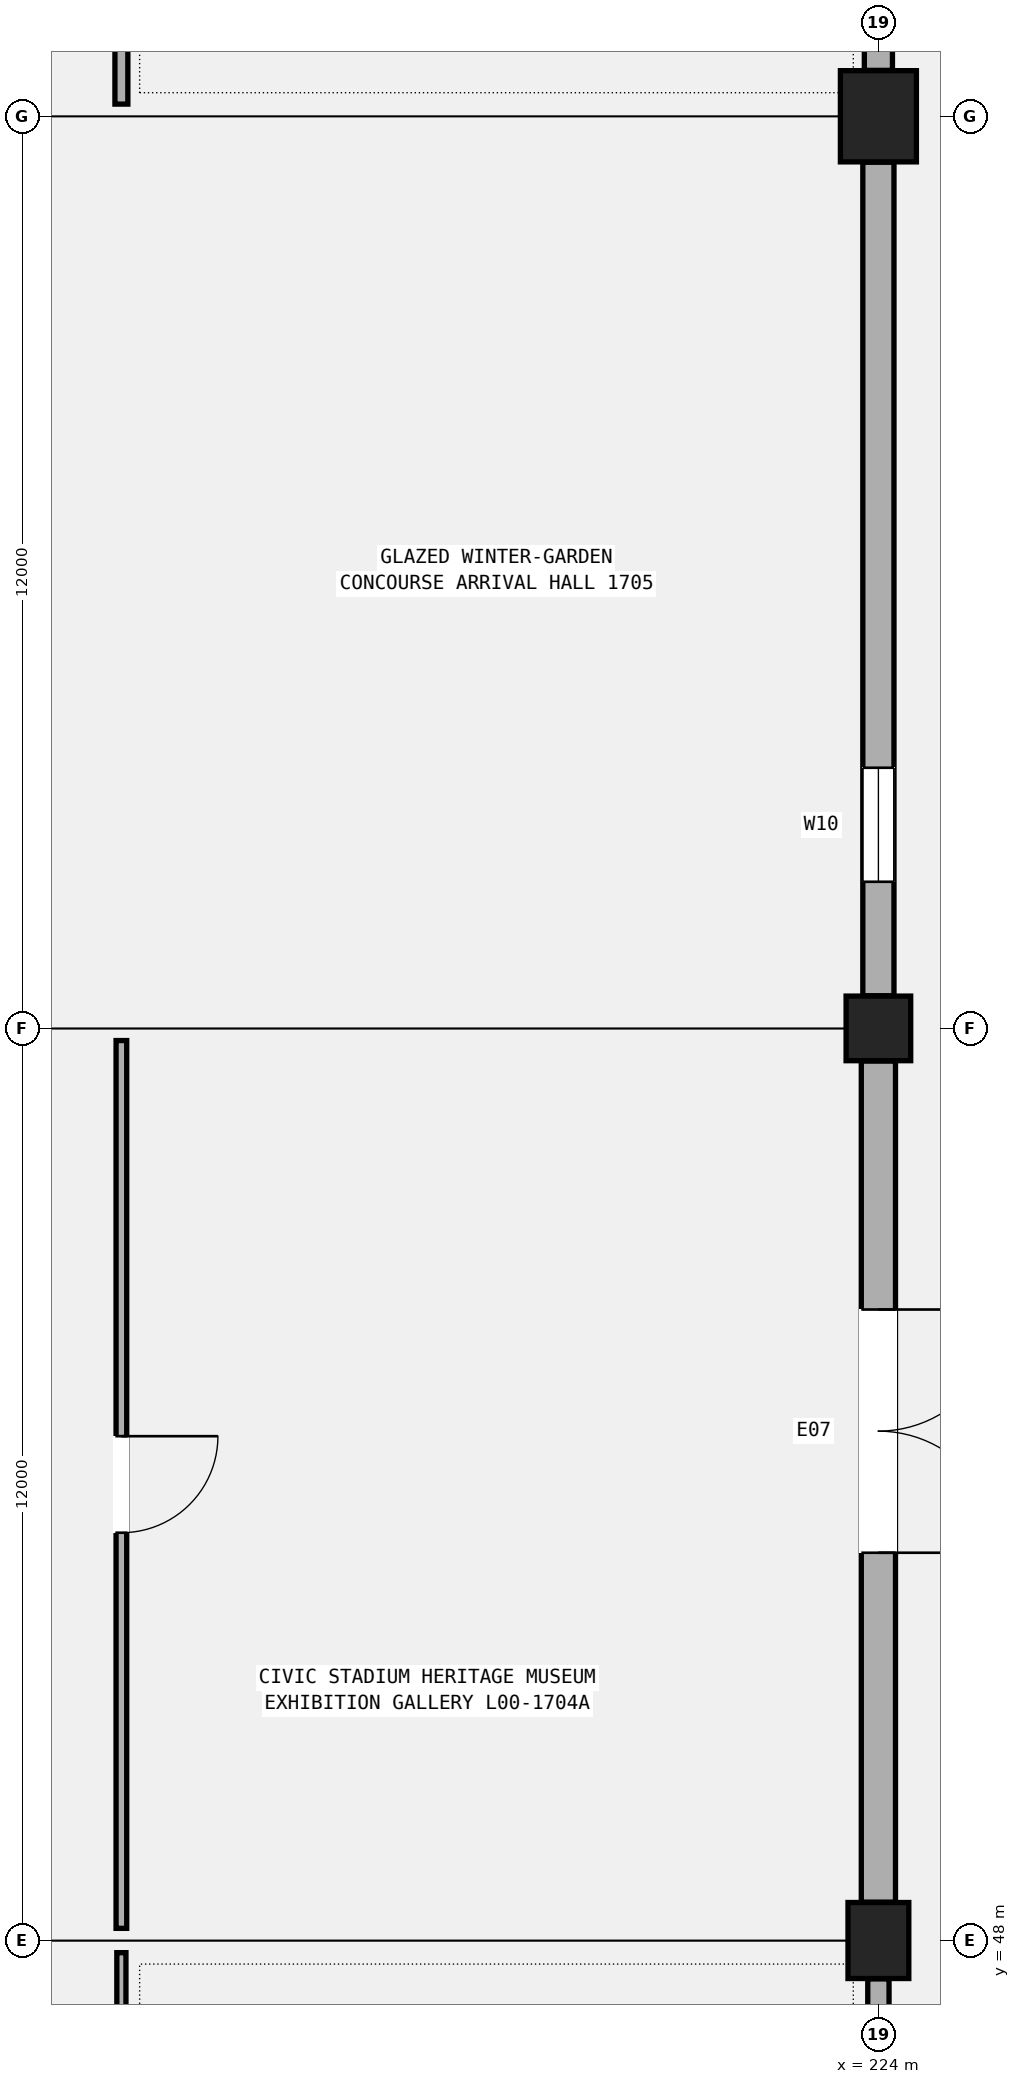
"""IFC4 building model, lengths in metres.
Left out: names, types, materials, properties, quantities, classifications, styles, units other than length and angle.
Written with IfcOpenShell. Run it as: python <this file> out.ifc"""

import sys

from ifc_helpers import new_model, si_unit, direction, frame, frame_2d, origin, origin_2d, place, context, subcontext, project, spatial, rectangle, circle, extrude, element, fill, save


model = new_model("IFC4")
c1 = context("Model", 3, precision=1e-05, world=origin(), true_north=direction((0.0, 1.0)))
c2 = subcontext(c1, "Body", "Model", "MODEL_VIEW")
j1 = project(units=[si_unit("LENGTHUNIT", "METRE"), si_unit("PLANEANGLEUNIT", "RADIAN")], contexts=[c1])
p1 = place(None, origin())
s1 = spatial("IfcSite", under=j1, at=p1, CompositionType="ELEMENT")
p2 = place(p1, origin())
s2 = spatial("IfcBuilding", under=s1, at=p2, CompositionType="ELEMENT")
p3 = place(p2, origin())
s3 = spatial("IfcBuildingStorey", under=s2, at=p3, CompositionType="ELEMENT", Elevation=0.0)
p4 = place(p3, frame((224.0, 48.0, 0.0), z_axis=(0.0, 0.0, 1.0), x_axis=(1.0, 0.0, 0.0)))
e1 = element("IfcColumn", 1, at=p4, inside=s3, PredefinedType="COLUMN", context=c2, shape_type="SweptSolid", body=[
    extrude(rectangle(XDim=0.8, YDim=1.0, at=origin_2d()), origin(), (0.0, 0.0, 1.0), 5.4),
])
p5 = place(p3, frame((224.0, 60.0, 0.0), z_axis=(0.0, 0.0, 1.0), x_axis=(1.0, 0.0, 0.0)))
e2 = element("IfcColumn", 2, at=p5, inside=s3, PredefinedType="COLUMN", context=c2, shape_type="SweptSolid", body=[
    extrude(circle(Radius=0.425, at=origin_2d()), origin(), (0.0, 0.0, 1.0), 5.4),
])
p6 = place(p3, frame((224.0, 72.0, 0.0), z_axis=(0.0, 0.0, 1.0), x_axis=(1.0, 0.0, 0.0)))
e3 = element("IfcColumn", 3, at=p6, inside=s3, PredefinedType="COLUMN", context=c2, shape_type="SweptSolid", body=[
    extrude(rectangle(XDim=1.0, YDim=1.2, at=origin_2d()), origin(), (0.0, 0.0, 1.0), 5.4),
])
p7 = place(p3, frame((224.0, 36.554, 0.0), z_axis=(0.0, 0.0, 1.0), x_axis=(0.0, 1.0, 0.0)))
e4 = element("IfcWall", 4, at=p7, inside=s3, PredefinedType="SOLIDWALL", context=c2, shape_type="SweptSolid", body=[
    extrude(rectangle(XDim=10.942, YDim=0.28, at=frame_2d((5.471, 0.0))), origin(), (0.0, 0.0, 1.0), 4.24),
])
p8 = place(p7, frame((1.5, 0.0, 0.95)))
e5 = element("IfcOpeningElement", 5, at=p8, cuts=e4, PredefinedType="OPENING", context=c2, shape_type="SweptSolid", body=[
    extrude(rectangle(XDim=1.5, YDim=1.8, at=frame_2d((0.75, 0.9))), frame((0.0, 0.15, 0.0), z_axis=(0.0, -1.0, 0.0), x_axis=(1.0, 0.0, 0.0)), (0.0, 0.0, 1.0), 0.3),
])
p9 = place(p3, frame((224.0, 48.504, 0.0), z_axis=(0.0, 0.0, 1.0), x_axis=(0.0, 1.0, 0.0)))
e6 = element("IfcWall", 6, at=p9, inside=s3, PredefinedType="SOLIDWALL", context=c2, shape_type="SweptSolid", body=[
    extrude(rectangle(XDim=11.067, YDim=0.45, at=frame_2d((5.534, 0.0))), origin(), (0.0, 0.0, 1.0), 4.34),
])
p10 = place(p9, frame((7.797, 0.0, 0.0), z_axis=(0.0, 0.0, 1.0), x_axis=(-1.0, 0.0, 0.0)))
e7 = element("IfcOpeningElement", 7, at=p10, cuts=e6, PredefinedType="OPENING", context=c2, shape_type="SweptSolid", body=[
    extrude(rectangle(XDim=3.2, YDim=2.6, at=frame_2d((1.6, 1.3))), frame((0.0, 0.235, 0.0), z_axis=(0.0, -1.0, 0.0), x_axis=(1.0, 0.0, 0.0)), (0.0, 0.0, 1.0), 0.47),
])
p11 = place(p3, frame((224.0, 60.429, 0.0), z_axis=(0.0, 0.0, 1.0), x_axis=(0.0, 1.0, 0.0)))
e8 = element("IfcWall", 8, at=p11, inside=s3, PredefinedType="SOLIDWALL", context=c2, shape_type="SweptSolid", body=[
    extrude(rectangle(XDim=10.967, YDim=0.41, at=frame_2d((5.483, 0.0))), origin(), (0.0, 0.0, 1.0), 4.44),
])
p12 = place(p11, frame((1.5, 0.0, 0.95)))
e9 = element("IfcOpeningElement", 9, at=p12, cuts=e8, PredefinedType="OPENING", context=c2, shape_type="SweptSolid", body=[
    extrude(rectangle(XDim=1.5, YDim=2.25, at=frame_2d((0.75, 1.125))), frame((0.0, 0.215, 0.0), z_axis=(0.0, -1.0, 0.0), x_axis=(1.0, 0.0, 0.0)), (0.0, 0.0, 1.0), 0.43),
])
p13 = place(p3, frame((224.0, 72.604, 0.0), z_axis=(0.0, 0.0, 1.0), x_axis=(0.0, 1.0, 0.0)))
e10 = element("IfcWall", 10, at=p13, inside=s3, PredefinedType="SOLIDWALL", context=c2, shape_type="SweptSolid", body=[
    extrude(rectangle(XDim=10.842, YDim=0.37, at=frame_2d((5.421, 0.0))), origin(), (0.0, 0.0, 1.0), 4.24),
])
p14 = place(p13, frame((1.5, 0.0, 0.95)))
e11 = element("IfcOpeningElement", 11, at=p14, cuts=e10, PredefinedType="OPENING", context=c2, shape_type="SweptSolid", body=[
    extrude(rectangle(XDim=1.65, YDim=2.05, at=frame_2d((0.825, 1.025))), frame((0.0, 0.195, 0.0), z_axis=(0.0, -1.0, 0.0), x_axis=(1.0, 0.0, 0.0)), (0.0, 0.0, 1.0), 0.39),
])
p15 = place(p3, frame((214.04, 37.97, 0.0), z_axis=(0.0, 0.0, 1.0), x_axis=(0.0, 1.0, 0.0)))
e12 = element("IfcWall", 12, at=p15, inside=s3, PredefinedType="PARTITIONING", context=c2, shape_type="SweptSolid", body=[
    extrude(rectangle(XDim=9.87, YDim=0.12, at=frame_2d((4.935, 0.0))), origin(), (0.0, 0.0, 1.0), 4.52),
])
p16 = place(p15, frame((5.555, 0.0, 0.0), z_axis=(0.0, 0.0, 1.0), x_axis=(-1.0, 0.0, 0.0)))
e13 = element("IfcOpeningElement", 13, at=p16, cuts=e12, PredefinedType="OPENING", context=c2, shape_type="SweptSolid", body=[
    extrude(rectangle(XDim=1.24, YDim=2.22, at=frame_2d((0.62, 1.11))), frame((0.0, 0.07, 0.0), z_axis=(0.0, -1.0, 0.0), x_axis=(1.0, 0.0, 0.0)), (0.0, 0.0, 1.0), 0.14),
])
p17 = place(p3, frame((214.04, 48.16, 0.0), z_axis=(0.0, 0.0, 1.0), x_axis=(0.0, 1.0, 0.0)))
e14 = element("IfcWall", 14, at=p17, inside=s3, PredefinedType="PARTITIONING", context=c2, shape_type="SweptSolid", body=[
    extrude(rectangle(XDim=11.68, YDim=0.14, at=frame_2d((5.84, 0.0))), origin(), (0.0, 0.0, 1.0), 4.52),
])
p18 = place(p17, frame((6.475, 0.0, 0.0), z_axis=(0.0, 0.0, 1.0), x_axis=(-1.0, 0.0, 0.0)))
e15 = element("IfcOpeningElement", 15, at=p18, cuts=e14, PredefinedType="OPENING", context=c2, shape_type="SweptSolid", body=[
    extrude(rectangle(XDim=1.27, YDim=2.2, at=frame_2d((0.635, 1.1))), frame((0.0, 0.08, 0.0), z_axis=(0.0, -1.0, 0.0), x_axis=(1.0, 0.0, 0.0)), (0.0, 0.0, 1.0), 0.16),
])
p19 = place(p3, frame((214.04, 72.16, 0.0), z_axis=(0.0, 0.0, 1.0), x_axis=(0.0, 1.0, 0.0)))
e16 = element("IfcWall", 16, at=p19, inside=s3, PredefinedType="PARTITIONING", context=c2, shape_type="SweptSolid", body=[
    extrude(rectangle(XDim=11.68, YDim=0.17, at=frame_2d((5.84, 0.0))), origin(), (0.0, 0.0, 1.0), 4.52),
])
p20 = place(p19, frame((6.49, 0.0, 0.0), z_axis=(0.0, 0.0, 1.0), x_axis=(-1.0, 0.0, 0.0)))
e17 = element("IfcOpeningElement", 17, at=p20, cuts=e16, PredefinedType="OPENING", context=c2, shape_type="SweptSolid", body=[
    extrude(rectangle(XDim=1.3, YDim=2.24, at=frame_2d((0.65, 1.12))), frame((0.0, 0.095, 0.0), z_axis=(0.0, -1.0, 0.0), x_axis=(1.0, 0.0, 0.0)), (0.0, 0.0, 1.0), 0.19),
])
p21 = place(p10, origin())
e18 = element("IfcDoor", 18, at=p21, inside=s3, OperationType="DOUBLE_DOOR_SINGLE_SWING", PredefinedType="DOOR", context=c2, shape_type="SweptSolid", body=[
    extrude(rectangle(XDim=3.2, YDim=2.6, at=frame_2d((1.6, 1.3))), frame((0.0, 0.025, 0.0), z_axis=(0.0, -1.0, 0.0), x_axis=(1.0, 0.0, 0.0)), (0.0, 0.0, 1.0), 0.05),
])
fill(e7, e18)
p22 = place(p12, origin())
e19 = element("IfcWindow", 19, at=p22, inside=s3, PartitioningType="SINGLE_PANEL", PredefinedType="WINDOW", context=c2, shape_type="SweptSolid", body=[
    extrude(rectangle(XDim=1.5, YDim=2.25, at=frame_2d((0.75, 1.125))), frame((0.0, 0.03, 0.0), z_axis=(0.0, -1.0, 0.0), x_axis=(1.0, 0.0, 0.0)), (0.0, 0.0, 1.0), 0.06),
])
fill(e9, e19)
p23 = place(p18, origin())
e20 = element("IfcDoor", 20, at=p23, inside=s3, OperationType="SINGLE_SWING_LEFT", PredefinedType="DOOR", context=c2, shape_type="SweptSolid", body=[
    extrude(rectangle(XDim=1.27, YDim=2.2, at=frame_2d((0.635, 1.1))), frame((0.0, 0.025, 0.0), z_axis=(0.0, -1.0, 0.0), x_axis=(1.0, 0.0, 0.0)), (0.0, 0.0, 1.0), 0.05),
])
fill(e15, e20)
save(model, sys.argv[1])
